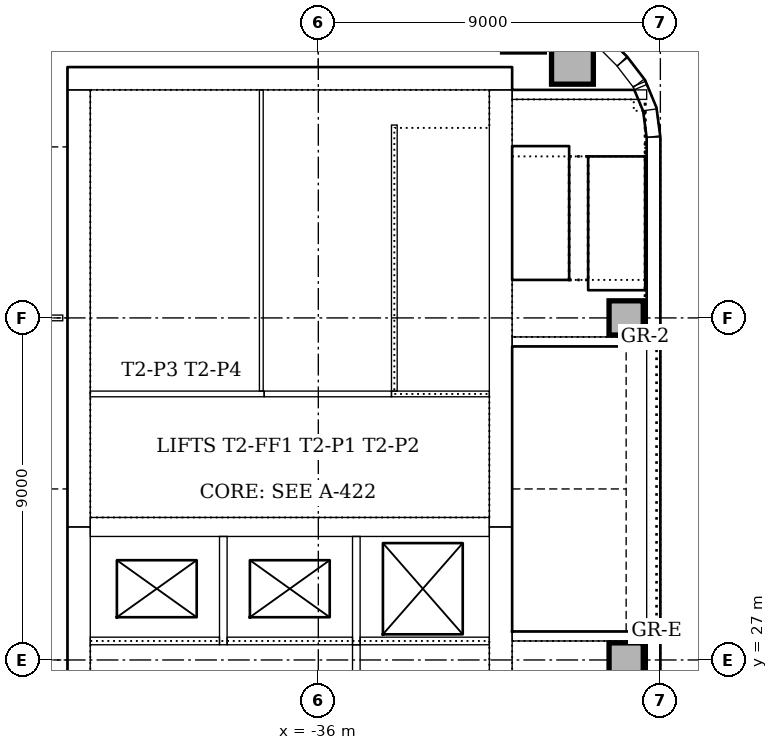
"""IFC4 building model, lengths in metres.
Left out: names, types, materials, properties, quantities, classifications, styles, units other than length and angle.
Written with IfcOpenShell. Run it as: python <this file> out.ifc"""

import sys

from ifc_helpers import new_model, si_unit, direction, frame, frame_2d, origin, origin_2d, place, context, subcontext, project, spatial, rectangle, extrude, element, fill, save


model = new_model("IFC4")
c1 = context("Model", 3, precision=1e-05, world=origin(), true_north=direction((0.0, 1.0)))
c2 = subcontext(c1, "Body", "Model", "MODEL_VIEW")
j1 = project(units=[si_unit("LENGTHUNIT", "METRE"), si_unit("PLANEANGLEUNIT", "RADIAN")], contexts=[c1])
p1 = place(None, origin())
s1 = spatial("IfcSite", under=j1, at=p1, CompositionType="ELEMENT")
p2 = place(p1, origin())
s2 = spatial("IfcBuilding", under=s1, at=p2, CompositionType="ELEMENT")
p3 = place(p2, frame((0.0, 0.0, 26.0)))
s3 = spatial("IfcBuildingStorey", under=s2, at=p3, CompositionType="ELEMENT", Elevation=26.0)
p4 = place(p3, frame((-30.9, 42.3, 0.0), z_axis=(0.0, 0.0, 1.0), x_axis=(-1.0, 0.0, 0.0)))
e1 = element("IfcWall", 1, at=p4, inside=s3, PredefinedType="SOLIDWALL", context=c2, shape_type="SweptSolid", body=[
    extrude(rectangle(XDim=11.7, YDim=0.6, at=frame_2d((5.85, 0.0))), origin(), (0.0, 0.0, 1.0), 4.0),
])
p5 = place(p3, frame((-31.2, 21.0, 0.0), z_axis=(0.0, 0.0, 1.0), x_axis=(0.0, 1.0, 0.0)))
e2 = element("IfcWall", 2, at=p5, inside=s3, PredefinedType="SOLIDWALL", context=c2, shape_type="SweptSolid", body=[
    extrude(rectangle(XDim=9.5, YDim=0.6, at=frame_2d((4.75, 0.0))), origin(), (0.0, 0.0, 1.0), 4.0),
])
p6 = place(p5, frame((5.25, 0.0, 0.0)))
e3 = element("IfcOpeningElement", 3, at=p6, cuts=e2, PredefinedType="OPENING", context=c2, shape_type="SweptSolid", body=[
    extrude(rectangle(XDim=1.0, YDim=2.1, at=frame_2d((0.5, 1.05))), frame((0.0, 0.31, 0.0), z_axis=(0.0, -1.0, 0.0), x_axis=(1.0, 0.0, 0.0)), (0.0, 0.0, 1.0), 0.62),
])
p7 = place(p3, frame((-31.2, 30.5, 0.0), z_axis=(0.0, 0.0, 1.0), x_axis=(0.0, 1.0, 0.0)))
e4 = element("IfcWall", 4, at=p7, inside=s3, PredefinedType="SOLIDWALL", context=c2, shape_type="SweptSolid", body=[
    extrude(rectangle(XDim=11.5, YDim=0.6, at=frame_2d((5.75, 0.0))), origin(), (0.0, 0.0, 1.0), 4.0),
])
p8 = place(p7, frame((0.85, 0.0, 0.0)))
e5 = element("IfcOpeningElement", 5, at=p8, cuts=e4, PredefinedType="OPENING", context=c2, shape_type="SweptSolid", body=[
    extrude(rectangle(XDim=1.8, YDim=2.1, at=frame_2d((0.9, 1.05))), frame((0.0, 0.31, 0.0), z_axis=(0.0, -1.0, 0.0), x_axis=(1.0, 0.0, 0.0)), (0.0, 0.0, 1.0), 0.62),
])
p9 = place(p3, frame((-42.3, 42.0, 0.0), z_axis=(0.0, 0.0, 1.0), x_axis=(0.0, -1.0, 0.0)))
e6 = element("IfcWall", 6, at=p9, inside=s3, PredefinedType="SOLIDWALL", context=c2, shape_type="SweptSolid", body=[
    extrude(rectangle(XDim=11.5, YDim=0.6, at=frame_2d((5.75, 0.0))), origin(), (0.0, 0.0, 1.0), 4.0),
])
p10 = place(p9, frame((8.85, 0.0, 0.0)))
e7 = element("IfcOpeningElement", 7, at=p10, cuts=e6, PredefinedType="OPENING", context=c2, shape_type="SweptSolid", body=[
    extrude(rectangle(XDim=1.8, YDim=2.1, at=frame_2d((0.9, 1.05))), frame((0.0, 0.31, 0.0), z_axis=(0.0, -1.0, 0.0), x_axis=(1.0, 0.0, 0.0)), (0.0, 0.0, 1.0), 0.62),
])
p11 = place(p3, frame((-42.3, 30.5, 0.0), z_axis=(0.0, 0.0, 1.0), x_axis=(0.0, -1.0, 0.0)))
e8 = element("IfcWall", 8, at=p11, inside=s3, PredefinedType="SOLIDWALL", context=c2, shape_type="SweptSolid", body=[
    extrude(rectangle(XDim=9.5, YDim=0.6, at=frame_2d((4.75, 0.0))), origin(), (0.0, 0.0, 1.0), 4.0),
])
p12 = place(p11, frame((3.85, 0.0, 0.0)))
e9 = element("IfcOpeningElement", 9, at=p12, cuts=e8, PredefinedType="OPENING", context=c2, shape_type="SweptSolid", body=[
    extrude(rectangle(XDim=1.8, YDim=2.1, at=frame_2d((0.9, 1.05))), frame((0.0, 0.31, 0.0), z_axis=(0.0, -1.0, 0.0), x_axis=(1.0, 0.0, 0.0)), (0.0, 0.0, 1.0), 0.62),
])
p13 = place(p3, frame((-42.0, 30.5, 0.0), z_axis=(0.0, 0.0, 1.0), x_axis=(1.0, 0.0, 0.0)))
e10 = element("IfcWall", 10, at=p13, inside=s3, PredefinedType="SOLIDWALL", context=c2, shape_type="SweptSolid", body=[
    extrude(rectangle(XDim=10.5, YDim=0.5, at=frame_2d((5.25, 0.0))), origin(), (0.0, 0.0, 1.0), 4.0),
])
p14 = place(p3, frame((-27.36, 27.625, 0.0), z_axis=(0.0, 0.0, 1.0), x_axis=(-1.0, 0.0, 0.0)))
e11 = element("IfcWall", 11, at=p14, inside=s3, PredefinedType="SOLIDWALL", context=c2, shape_type="SweptSolid", body=[
    extrude(rectangle(XDim=3.54, YDim=0.25, at=frame_2d((1.77, 0.0))), origin(), (0.0, 0.0, 1.0), 4.0),
])
p15 = place(p14, frame((1.69, 0.0, 0.0)))
e12 = element("IfcOpeningElement", 12, at=p15, cuts=e11, PredefinedType="OPENING", context=c2, shape_type="SweptSolid", body=[
    extrude(rectangle(XDim=1.1, YDim=2.1, at=frame_2d((0.55, 1.05))), frame((0.0, 0.135, 0.0), z_axis=(0.0, -1.0, 0.0), x_axis=(1.0, 0.0, 0.0)), (0.0, 0.0, 1.0), 0.27),
])
p16 = place(p3, frame((-30.9, 35.375, 0.0), z_axis=(0.0, 0.0, 1.0), x_axis=(1.0, 0.0, 0.0)))
e13 = element("IfcWall", 13, at=p16, inside=s3, PredefinedType="SOLIDWALL", context=c2, shape_type="SweptSolid", body=[
    extrude(rectangle(XDim=3.54, YDim=0.25, at=frame_2d((1.77, 0.0))), origin(), (0.0, 0.0, 1.0), 4.0),
])
p17 = place(p16, frame((0.75, 0.0, 0.0)))
e14 = element("IfcOpeningElement", 14, at=p17, cuts=e13, PredefinedType="OPENING", context=c2, shape_type="SweptSolid", body=[
    extrude(rectangle(XDim=1.1, YDim=2.1, at=frame_2d((0.55, 1.05))), frame((0.0, 0.135, 0.0), z_axis=(0.0, -1.0, 0.0), x_axis=(1.0, 0.0, 0.0)), (0.0, 0.0, 1.0), 0.27),
])
p18 = place(p3, frame((-27.36, 41.875, 0.0), z_axis=(0.0, 0.0, 1.0), x_axis=(-1.0, 0.0, 0.0)))
e15 = element("IfcWall", 15, at=p18, inside=s3, PredefinedType="SOLIDWALL", context=c2, shape_type="SweptSolid", body=[
    extrude(rectangle(XDim=3.54, YDim=0.25, at=frame_2d((1.77, 0.0))), origin(), (0.0, 0.0, 1.0), 4.0),
])
for number, where, z_axis, x_axis in (
    (16, (-29.313, 42.7, 0.0), (0.0, 0.0, 1.0), (1.0, 0.0, 0.0)),
    (17, (-30.602, 43.547, 0.0), (0.0, 0.0, 1.0), (1.0, 0.0, 0.0)),
):
    element("IfcColumn", number, at=place(p3, frame(where, z_axis=z_axis, x_axis=x_axis)), inside=s3, PredefinedType="COLUMN", context=c2, shape_type="SweptSolid", body=[
        extrude(rectangle(XDim=1.1, YDim=1.1, at=origin_2d()), origin(), (0.0, 0.0, 1.0), 3.85),
    ])
for number, where, z_axis, x_axis in (
    (18, (-27.9, 27.0, 0.0), (0.0, 0.0, 1.0), (1.0, 0.0, 0.0)),
    (19, (-27.9, 36.0, 0.0), (0.0, 0.0, 1.0), (1.0, 0.0, 0.0)),
):
    element("IfcColumn", number, at=place(p3, frame(where, z_axis=z_axis, x_axis=x_axis)), inside=s3, PredefinedType="COLUMN", context=c2, shape_type="SweptSolid", body=[
        extrude(rectangle(XDim=0.9, YDim=0.9, at=origin_2d()), origin(), (0.0, 0.0, 1.0), 4.0),
    ])
p19 = place(p3, frame((-27.18, 21.0, 0.0), z_axis=(0.0, 0.0, 1.0), x_axis=(0.0, 1.0, 0.0)))
e20 = element("IfcWall", 20, at=p19, inside=s3, PredefinedType="STANDARD", context=c2, shape_type="SweptSolid", body=[
    extrude(rectangle(XDim=6.75, YDim=0.36, at=frame_2d((3.375, 0.0))), origin(), (0.0, 0.0, 1.0), 3.85),
])
p20 = place(p3, frame((-27.18, 27.75, 0.0), z_axis=(0.0, 0.0, 1.0), x_axis=(0.0, 1.0, 0.0)))
e21 = element("IfcWall", 21, at=p20, inside=s3, PredefinedType="STANDARD", context=c2, shape_type="SweptSolid", body=[
    extrude(rectangle(XDim=7.5, YDim=0.36, at=frame_2d((3.75, 0.0))), origin(), (0.0, 0.0, 1.0), 3.85),
])
p21 = place(p20, frame((2.85, 0.0, 1.2)))
e22 = element("IfcOpeningElement", 22, at=p21, cuts=e21, PredefinedType="OPENING", context=c2, shape_type="SweptSolid", body=[
    extrude(rectangle(XDim=1.8, YDim=1.2, at=frame_2d((0.9, 0.6))), frame((0.0, 0.19, 0.0), z_axis=(0.0, -1.0, 0.0), x_axis=(1.0, 0.0, 0.0)), (0.0, 0.0, 1.0), 0.38),
])
p22 = place(p3, frame((-27.18, 35.25, 0.0), z_axis=(0.0, 0.0, 1.0), x_axis=(0.0, 1.0, 0.0)))
e23 = element("IfcWall", 23, at=p22, inside=s3, PredefinedType="STANDARD", context=c2, shape_type="SweptSolid", body=[
    extrude(rectangle(XDim=5.507, YDim=0.36, at=frame_2d((2.754, 0.0))), origin(), (0.0, 0.0, 1.0), 3.85),
])
p23 = place(p3, frame((-28.006, 42.751, 0.0), z_axis=(0.0, 0.0, 1.0), x_axis=(-0.707106781187, 0.707106781187, 0.0)))
e24 = element("IfcWall", 24, at=p23, inside=s3, PredefinedType="STANDARD", context=c2, shape_type="SweptSolid", body=[
    extrude(rectangle(XDim=1.757, YDim=0.36, at=frame_2d((0.879, 0.0))), origin(), (0.0, 0.0, 1.0), 3.85),
])
p24 = place(p3, frame((-27.183, 40.769, 0.0), z_axis=(0.0, 0.0, 1.0), x_axis=(-0.13055608231, 0.99144092581, 0.0)))
e25 = element("IfcWall", 25, at=p24, inside=s3, PredefinedType="STANDARD", context=c2, shape_type="SweptSolid", body=[
    extrude(rectangle(XDim=0.713, YDim=0.36, at=frame_2d((0.356, 0.0))), origin(), (0.0, 0.0, 1.0), 3.85),
])
p25 = place(p3, frame((-27.521, 42.074, 0.0), z_axis=(0.0, 0.0, 1.0), x_axis=(-0.382549378284, 0.923935048136, 0.0)))
e26 = element("IfcWall", 26, at=p25, inside=s3, PredefinedType="STANDARD", context=c2, shape_type="SweptSolid", body=[
    extrude(rectangle(XDim=0.089, YDim=0.36, at=frame_2d((0.045, 0.0))), origin(), (0.0, 0.0, 1.0), 3.85),
])
p26 = place(p3, frame((-27.566, 42.175, 0.0), z_axis=(0.0, 0.0, 1.0), x_axis=(-0.608802368033, 0.793321924995, 0.0)))
e27 = element("IfcWall", 27, at=p26, inside=s3, PredefinedType="STANDARD", context=c2, shape_type="SweptSolid", body=[
    extrude(rectangle(XDim=0.713, YDim=0.36, at=frame_2d((0.357, 0.0))), origin(), (0.0, 0.0, 1.0), 3.85),
])
p27 = place(p3, frame((-38.5, 27.4, 0.0), z_axis=(0.0, 0.0, 1.0), x_axis=(0.0, 1.0, 0.0)))
e28 = element("IfcWall", 28, at=p27, inside=s3, PredefinedType="SOLIDWALL", context=c2, shape_type="SweptSolid", body=[
    extrude(rectangle(XDim=2.85, YDim=0.2, at=frame_2d((1.425, 0.0))), origin(), (0.0, 0.0, 1.0), 4.0),
])
p28 = place(p3, frame((-42.0, 27.5, 0.0), z_axis=(0.0, 0.0, 1.0), x_axis=(1.0, 0.0, 0.0)))
e29 = element("IfcWall", 29, at=p28, inside=s3, PredefinedType="SOLIDWALL", context=c2, shape_type="SweptSolid", body=[
    extrude(rectangle(XDim=3.4, YDim=0.2, at=frame_2d((1.7, 0.0))), origin(), (0.0, 0.0, 1.0), 4.0),
])
p29 = place(p28, frame((1.5, 0.0, 0.0)))
e30 = element("IfcOpeningElement", 30, at=p29, cuts=e29, PredefinedType="OPENING", context=c2, shape_type="SweptSolid", body=[
    extrude(rectangle(XDim=1.1, YDim=2.1, at=frame_2d((0.55, 1.05))), frame((0.0, 0.11, 0.0), z_axis=(0.0, -1.0, 0.0), x_axis=(1.0, 0.0, 0.0)), (0.0, 0.0, 1.0), 0.22),
])
p30 = place(p3, frame((-35.0, 27.4, 0.0), z_axis=(0.0, 0.0, 1.0), x_axis=(0.0, 1.0, 0.0)))
e31 = element("IfcWall", 31, at=p30, inside=s3, PredefinedType="SOLIDWALL", context=c2, shape_type="SweptSolid", body=[
    extrude(rectangle(XDim=2.85, YDim=0.2, at=frame_2d((1.425, 0.0))), origin(), (0.0, 0.0, 1.0), 4.0),
])
p31 = place(p3, frame((-38.4, 27.5, 0.0), z_axis=(0.0, 0.0, 1.0), x_axis=(1.0, 0.0, 0.0)))
e32 = element("IfcWall", 32, at=p31, inside=s3, PredefinedType="SOLIDWALL", context=c2, shape_type="SweptSolid", body=[
    extrude(rectangle(XDim=3.3, YDim=0.2, at=frame_2d((1.65, 0.0))), origin(), (0.0, 0.0, 1.0), 4.0),
])
p32 = place(p31, frame((1.1, 0.0, 0.0)))
e33 = element("IfcOpeningElement", 33, at=p32, cuts=e32, PredefinedType="OPENING", context=c2, shape_type="SweptSolid", body=[
    extrude(rectangle(XDim=1.1, YDim=2.1, at=frame_2d((0.55, 1.05))), frame((0.0, 0.11, 0.0), z_axis=(0.0, -1.0, 0.0), x_axis=(1.0, 0.0, 0.0)), (0.0, 0.0, 1.0), 0.22),
])
p33 = place(p3, frame((-34.9, 27.5, 0.0), z_axis=(0.0, 0.0, 1.0), x_axis=(1.0, 0.0, 0.0)))
e34 = element("IfcWall", 34, at=p33, inside=s3, PredefinedType="SOLIDWALL", context=c2, shape_type="SweptSolid", body=[
    extrude(rectangle(XDim=3.4, YDim=0.2, at=frame_2d((1.7, 0.0))), origin(), (0.0, 0.0, 1.0), 4.0),
])
p34 = place(p33, frame((1.1, 0.0, 0.0)))
e35 = element("IfcOpeningElement", 35, at=p34, cuts=e34, PredefinedType="OPENING", context=c2, shape_type="SweptSolid", body=[
    extrude(rectangle(XDim=1.1, YDim=2.1, at=frame_2d((0.55, 1.05))), frame((0.0, 0.11, 0.0), z_axis=(0.0, -1.0, 0.0), x_axis=(1.0, 0.0, 0.0)), (0.0, 0.0, 1.0), 0.22),
])
p35 = place(p3, frame((-35.0, 24.1, 0.0), z_axis=(0.0, 0.0, 1.0), x_axis=(0.0, 1.0, 0.0)))
e36 = element("IfcWall", 36, at=p35, inside=s3, PredefinedType="SOLIDWALL", context=c2, shape_type="SweptSolid", body=[
    extrude(rectangle(XDim=3.3, YDim=0.2, at=frame_2d((1.65, 0.0))), origin(), (0.0, 0.0, 1.0), 4.0),
])
p36 = place(p35, frame((1.15, 0.0, 0.0)))
e37 = element("IfcOpeningElement", 37, at=p36, cuts=e36, PredefinedType="OPENING", context=c2, shape_type="SweptSolid", body=[
    extrude(rectangle(XDim=1.0, YDim=2.1, at=frame_2d((0.5, 1.05))), frame((0.0, 0.11, 0.0), z_axis=(0.0, -1.0, 0.0), x_axis=(1.0, 0.0, 0.0)), (0.0, 0.0, 1.0), 0.22),
])
p37 = place(p3, frame((-34.075, 34.0, 0.0), z_axis=(0.0, 0.0, 1.0), x_axis=(1.0, 0.0, 0.0)))
e38 = element("IfcWall", 38, at=p37, inside=s3, PredefinedType="SOLIDWALL", context=c2, shape_type="SweptSolid", body=[
    extrude(rectangle(XDim=2.575, YDim=0.15, at=frame_2d((1.288, 0.0))), origin(), (0.0, 0.0, 1.0), 4.0),
])
p38 = place(p3, frame((-34.0, 41.075, 0.0), z_axis=(0.0, 0.0, 1.0), x_axis=(0.0, -1.0, 0.0)))
e39 = element("IfcWall", 39, at=p38, inside=s3, PredefinedType="SOLIDWALL", context=c2, shape_type="SweptSolid", body=[
    extrude(rectangle(XDim=7.0, YDim=0.15, at=frame_2d((3.5, 0.0))), origin(), (0.0, 0.0, 1.0), 4.0),
])
p39 = place(p3, frame((-37.425, 34.0, 0.0), z_axis=(0.0, 0.0, 1.0), x_axis=(-1.0, 0.0, 0.0)))
e40 = element("IfcWall", 40, at=p39, inside=s3, PredefinedType="PARTITIONING", context=c2, shape_type="SweptSolid", body=[
    extrude(rectangle(XDim=4.575, YDim=0.15, at=frame_2d((2.288, 0.0))), origin(), (0.0, 0.0, 1.0), 3.85),
])
p40 = place(p39, frame((1.925, 0.0, 0.0)))
e41 = element("IfcOpeningElement", 41, at=p40, cuts=e40, PredefinedType="OPENING", context=c2, shape_type="SweptSolid", body=[
    extrude(rectangle(XDim=0.8, YDim=2.1, at=frame_2d((0.4, 1.05))), frame((0.0, 0.085, 0.0), z_axis=(0.0, -1.0, 0.0), x_axis=(1.0, 0.0, 0.0)), (0.0, 0.0, 1.0), 0.17),
])
p41 = place(p3, frame((-34.075, 34.0, 0.0), z_axis=(0.0, 0.0, 1.0), x_axis=(-1.0, 0.0, 0.0)))
e42 = element("IfcWall", 42, at=p41, inside=s3, PredefinedType="PARTITIONING", context=c2, shape_type="SweptSolid", body=[
    extrude(rectangle(XDim=3.35, YDim=0.15, at=frame_2d((1.675, 0.0))), origin(), (0.0, 0.0, 1.0), 3.85),
])
p42 = place(p41, frame((1.275, 0.0, 0.0)))
e43 = element("IfcOpeningElement", 43, at=p42, cuts=e42, PredefinedType="OPENING", context=c2, shape_type="SweptSolid", body=[
    extrude(rectangle(XDim=0.8, YDim=2.1, at=frame_2d((0.4, 1.05))), frame((0.0, 0.085, 0.0), z_axis=(0.0, -1.0, 0.0), x_axis=(1.0, 0.0, 0.0)), (0.0, 0.0, 1.0), 0.17),
])
p43 = place(p3, frame((-37.5, 34.075, 0.0), z_axis=(0.0, 0.0, 1.0), x_axis=(0.0, 1.0, 0.0)))
e44 = element("IfcWall", 44, at=p43, inside=s3, PredefinedType="PARTITIONING", context=c2, shape_type="SweptSolid", body=[
    extrude(rectangle(XDim=7.925, YDim=0.1, at=frame_2d((3.962, 0.0))), origin(), (0.0, 0.0, 1.0), 3.85),
])
p44 = place(p3, frame((-44.6, 36.0, 0.0), z_axis=(0.0, 0.0, 1.0), x_axis=(1.0, 0.0, 0.0)))
e45 = element("IfcWall", 45, at=p44, inside=s3, PredefinedType="PARTITIONING", context=c2, shape_type="SweptSolid", body=[
    extrude(rectangle(XDim=1.875, YDim=0.15, at=frame_2d((0.938, 0.0))), origin(), (0.0, 0.0, 1.0), 3.602),
])
p45 = place(p44, frame((0.5, 0.0, 0.0)))
e46 = element("IfcOpeningElement", 46, at=p45, cuts=e45, PredefinedType="OPENING", context=c2, shape_type="SweptSolid", body=[
    extrude(rectangle(XDim=0.9, YDim=2.1, at=frame_2d((0.45, 1.05))), frame((0.0, 0.085, 0.0), z_axis=(0.0, -1.0, 0.0), x_axis=(1.0, 0.0, 0.0)), (0.0, 0.0, 1.0), 0.17),
])
p46 = place(p21, origin())
e47 = element("IfcWindow", 47, at=p46, inside=s3, PartitioningType="SINGLE_PANEL", PredefinedType="WINDOW", context=c2, shape_type="SweptSolid", body=[
    extrude(rectangle(XDim=1.8, YDim=1.2, at=frame_2d((0.9, 0.6))), frame((0.0, 0.13, 0.0), z_axis=(0.0, -1.0, 0.0), x_axis=(1.0, 0.0, 0.0)), (0.0, 0.0, 1.0), 0.06),
])
fill(e22, e47)
p47 = place(p29, origin())
e48 = element("IfcDoor", 48, at=p47, inside=s3, OperationType="SLIDING_TO_LEFT", PredefinedType="DOOR", context=c2, shape_type="SweptSolid", body=[
    extrude(rectangle(XDim=1.1, YDim=2.1, at=frame_2d((0.55, 1.05))), frame((0.0, 0.025, 0.0), z_axis=(0.0, -1.0, 0.0), x_axis=(1.0, 0.0, 0.0)), (0.0, 0.0, 1.0), 0.05),
])
fill(e30, e48)
p48 = place(p32, origin())
e49 = element("IfcDoor", 49, at=p48, inside=s3, OperationType="SLIDING_TO_LEFT", PredefinedType="DOOR", context=c2, shape_type="SweptSolid", body=[
    extrude(rectangle(XDim=1.1, YDim=2.1, at=frame_2d((0.55, 1.05))), frame((0.0, 0.025, 0.0), z_axis=(0.0, -1.0, 0.0), x_axis=(1.0, 0.0, 0.0)), (0.0, 0.0, 1.0), 0.05),
])
fill(e33, e49)
p49 = place(p34, origin())
e50 = element("IfcDoor", 50, at=p49, inside=s3, OperationType="SLIDING_TO_LEFT", PredefinedType="DOOR", context=c2, shape_type="SweptSolid", body=[
    extrude(rectangle(XDim=1.1, YDim=2.1, at=frame_2d((0.55, 1.05))), frame((0.0, 0.025, 0.0), z_axis=(0.0, -1.0, 0.0), x_axis=(1.0, 0.0, 0.0)), (0.0, 0.0, 1.0), 0.05),
])
fill(e35, e50)
p50 = place(p6, frame((1.0, 0.0, 0.0), z_axis=(0.0, 0.0, 1.0), x_axis=(-1.0, 0.0, 0.0)))
e51 = element("IfcDoor", 51, at=p50, inside=s3, OperationType="SINGLE_SWING_LEFT", PredefinedType="DOOR", context=c2, shape_type="SweptSolid", body=[
    extrude(rectangle(XDim=1.0, YDim=2.1, at=frame_2d((0.5, 1.05))), frame((0.0, 0.025, 0.0), z_axis=(0.0, -1.0, 0.0), x_axis=(1.0, 0.0, 0.0)), (0.0, 0.0, 1.0), 0.05),
])
fill(e3, e51)
p51 = place(p15, origin())
e52 = element("IfcDoor", 52, at=p51, inside=s3, OperationType="SINGLE_SWING_RIGHT", PredefinedType="DOOR", context=c2, shape_type="SweptSolid", body=[
    extrude(rectangle(XDim=1.1, YDim=2.1, at=frame_2d((0.55, 1.05))), frame((0.0, 0.025, 0.0), z_axis=(0.0, -1.0, 0.0), x_axis=(1.0, 0.0, 0.0)), (0.0, 0.0, 1.0), 0.05),
])
fill(e12, e52)
p52 = place(p17, origin())
e53 = element("IfcDoor", 53, at=p52, inside=s3, OperationType="SINGLE_SWING_RIGHT", PredefinedType="DOOR", context=c2, shape_type="SweptSolid", body=[
    extrude(rectangle(XDim=1.1, YDim=2.1, at=frame_2d((0.55, 1.05))), frame((0.0, 0.025, 0.0), z_axis=(0.0, -1.0, 0.0), x_axis=(1.0, 0.0, 0.0)), (0.0, 0.0, 1.0), 0.05),
])
fill(e14, e53)
p53 = place(p8, origin())
e54 = element("IfcDoor", 54, at=p53, inside=s3, OperationType="DOUBLE_DOOR_SINGLE_SWING", PredefinedType="DOOR", context=c2, shape_type="SweptSolid", body=[
    extrude(rectangle(XDim=1.8, YDim=2.1, at=frame_2d((0.9, 1.05))), frame((0.0, 0.025, 0.0), z_axis=(0.0, -1.0, 0.0), x_axis=(1.0, 0.0, 0.0)), (0.0, 0.0, 1.0), 0.05),
])
fill(e5, e54)
p54 = place(p10, frame((1.8, 0.0, 0.0), z_axis=(0.0, 0.0, 1.0), x_axis=(-1.0, 0.0, 0.0)))
e55 = element("IfcDoor", 55, at=p54, inside=s3, OperationType="DOUBLE_DOOR_SINGLE_SWING", PredefinedType="DOOR", context=c2, shape_type="SweptSolid", body=[
    extrude(rectangle(XDim=1.8, YDim=2.1, at=frame_2d((0.9, 1.05))), frame((0.0, 0.025, 0.0), z_axis=(0.0, -1.0, 0.0), x_axis=(1.0, 0.0, 0.0)), (0.0, 0.0, 1.0), 0.05),
])
fill(e7, e55)
p55 = place(p40, frame((0.8, 0.0, 0.0), z_axis=(0.0, 0.0, 1.0), x_axis=(-1.0, 0.0, 0.0)))
e56 = element("IfcDoor", 56, at=p55, inside=s3, OperationType="SINGLE_SWING_RIGHT", PredefinedType="DOOR", context=c2, shape_type="SweptSolid", body=[
    extrude(rectangle(XDim=0.8, YDim=2.1, at=frame_2d((0.4, 1.05))), frame((0.0, 0.025, 0.0), z_axis=(0.0, -1.0, 0.0), x_axis=(1.0, 0.0, 0.0)), (0.0, 0.0, 1.0), 0.05),
])
fill(e41, e56)
p56 = place(p42, frame((0.8, 0.0, 0.0), z_axis=(0.0, 0.0, 1.0), x_axis=(-1.0, 0.0, 0.0)))
e57 = element("IfcDoor", 57, at=p56, inside=s3, OperationType="SINGLE_SWING_LEFT", PredefinedType="DOOR", context=c2, shape_type="SweptSolid", body=[
    extrude(rectangle(XDim=0.8, YDim=2.1, at=frame_2d((0.4, 1.05))), frame((0.0, 0.025, 0.0), z_axis=(0.0, -1.0, 0.0), x_axis=(1.0, 0.0, 0.0)), (0.0, 0.0, 1.0), 0.05),
])
fill(e43, e57)
save(model, sys.argv[1])
